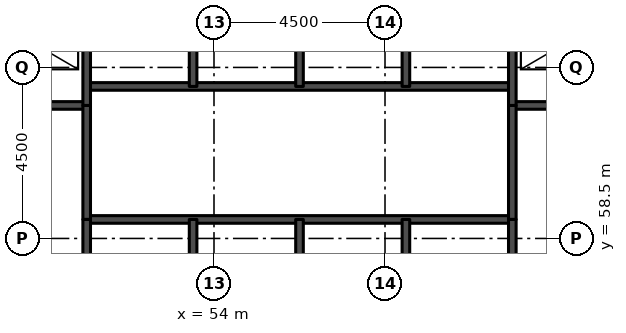
"""IFC4 building model, lengths in metres.
Left out: names, types, materials, properties, quantities, classifications, styles, units other than length and angle.
Written with IfcOpenShell. Run it as: python <this file> out.ifc"""

import sys

from ifc_helpers import new_model, si_unit, direction, frame, frame_2d, origin, place, context, subcontext, project, spatial, rectangle, extrude, element, save


model = new_model("IFC4")
c1 = context("Model", 3, precision=1e-05, world=origin(), true_north=direction((0.0, 1.0)))
c2 = subcontext(c1, "Body", "Model", "MODEL_VIEW")
j1 = project(units=[si_unit("LENGTHUNIT", "METRE"), si_unit("PLANEANGLEUNIT", "RADIAN")], contexts=[c1])
p1 = place(None, origin())
s1 = spatial("IfcSite", under=j1, at=p1, CompositionType="ELEMENT")
p2 = place(p1, origin())
s2 = spatial("IfcBuilding", under=s1, at=p2, CompositionType="ELEMENT")
p3 = place(p2, frame((0.0, 0.0, 49.5)))
s3 = spatial("IfcBuildingStorey", under=s2, at=p3, CompositionType="ELEMENT", Elevation=49.5)
p4 = place(p3, frame((50.65, 59.0, 0.0), z_axis=(0.0, 0.0, 1.0), x_axis=(1.0, 0.0, 0.0)))
e1 = element("IfcWall", 1, at=p4, inside=s3, PredefinedType="SOLIDWALL", context=c2, shape_type="SweptSolid", body=[
    extrude(rectangle(XDim=11.2, YDim=0.2, at=frame_2d((5.6, 0.0))), origin(), (0.0, 0.0, 1.0), 3.3),
])
for number, where, z_axis, x_axis in (
    (2, (45.5, 62.0, 0.0), (0.0, 0.0, 1.0), (1.0, 0.0, 0.0)),
    (3, (61.85, 62.0, 0.0), (0.0, 0.0, 1.0), (1.0, 0.0, 0.0)),
):
    element("IfcWall", number, at=place(p3, frame(where, z_axis=z_axis, x_axis=x_axis)), inside=s3, PredefinedType="SOLIDWALL", context=c2, shape_type="SweptSolid", body=[
        extrude(rectangle(XDim=5.15, YDim=0.2, at=frame_2d((2.575, 0.0))), origin(), (0.0, 0.0, 1.0), 3.08),
    ])
p5 = place(p3, frame((50.65, 62.5, 0.0), z_axis=(0.0, 0.0, 1.0), x_axis=(1.0, 0.0, 0.0)))
e4 = element("IfcWall", 4, at=p5, inside=s3, PredefinedType="SOLIDWALL", context=c2, shape_type="SweptSolid", body=[
    extrude(rectangle(XDim=11.2, YDim=0.2, at=frame_2d((5.6, 0.0))), origin(), (0.0, 0.0, 1.0), 3.3),
])
p6 = place(p3, frame((50.65, 59.0, 0.0), z_axis=(0.0, 0.0, 1.0), x_axis=(0.0, 1.0, 0.0)))
e5 = element("IfcWall", 5, at=p6, inside=s3, PredefinedType="SOLIDWALL", context=c2, shape_type="SweptSolid", body=[
    extrude(rectangle(XDim=3.0, YDim=0.2, at=frame_2d((1.5, 0.0))), origin(), (0.0, 0.0, 1.0), 3.3),
])
p7 = place(p3, frame((50.65, 56.2, 0.0), z_axis=(0.0, 0.0, 1.0), x_axis=(0.0, 1.0, 0.0)))
e6 = element("IfcWall", 6, at=p7, inside=s3, PredefinedType="SOLIDWALL", context=c2, shape_type="SweptSolid", body=[
    extrude(rectangle(XDim=2.8, YDim=0.2, at=frame_2d((1.4, 0.0))), origin(), (0.0, 0.0, 1.0), 3.08),
])
p8 = place(p3, frame((50.65, 62.0, 0.0), z_axis=(0.0, 0.0, 1.0), x_axis=(0.0, 1.0, 0.0)))
e7 = element("IfcWall", 7, at=p8, inside=s3, PredefinedType="SOLIDWALL", context=c2, shape_type="SweptSolid", body=[
    extrude(rectangle(XDim=3.3, YDim=0.2, at=frame_2d((1.65, 0.0))), origin(), (0.0, 0.0, 1.0), 3.08),
])
for number, where, z_axis, x_axis in (
    (8, (53.45, 56.2, 0.0), (0.0, 0.0, 1.0), (0.0, 1.0, 0.0)),
    (9, (53.45, 62.5, 0.0), (0.0, 0.0, 1.0), (0.0, 1.0, 0.0)),
    (10, (56.25, 56.2, 0.0), (0.0, 0.0, 1.0), (0.0, 1.0, 0.0)),
    (11, (56.25, 62.5, 0.0), (0.0, 0.0, 1.0), (0.0, 1.0, 0.0)),
    (12, (59.05, 56.2, 0.0), (0.0, 0.0, 1.0), (0.0, 1.0, 0.0)),
    (13, (59.05, 62.5, 0.0), (0.0, 0.0, 1.0), (0.0, 1.0, 0.0)),
):
    element("IfcWall", number, at=place(p3, frame(where, z_axis=z_axis, x_axis=x_axis)), inside=s3, PredefinedType="SOLIDWALL", context=c2, shape_type="SweptSolid", body=[
        extrude(rectangle(XDim=2.8, YDim=0.2, at=frame_2d((1.4, 0.0))), origin(), (0.0, 0.0, 1.0), 3.08),
    ])
p9 = place(p3, frame((61.85, 59.0, 0.0), z_axis=(0.0, 0.0, 1.0), x_axis=(0.0, 1.0, 0.0)))
e14 = element("IfcWall", 14, at=p9, inside=s3, PredefinedType="SOLIDWALL", context=c2, shape_type="SweptSolid", body=[
    extrude(rectangle(XDim=3.0, YDim=0.2, at=frame_2d((1.5, 0.0))), origin(), (0.0, 0.0, 1.0), 3.3),
])
p10 = place(p3, frame((61.85, 56.2, 0.0), z_axis=(0.0, 0.0, 1.0), x_axis=(0.0, 1.0, 0.0)))
e15 = element("IfcWall", 15, at=p10, inside=s3, PredefinedType="SOLIDWALL", context=c2, shape_type="SweptSolid", body=[
    extrude(rectangle(XDim=2.8, YDim=0.2, at=frame_2d((1.4, 0.0))), origin(), (0.0, 0.0, 1.0), 3.08),
])
p11 = place(p3, frame((61.85, 62.0, 0.0), z_axis=(0.0, 0.0, 1.0), x_axis=(0.0, 1.0, 0.0)))
e16 = element("IfcWall", 16, at=p11, inside=s3, PredefinedType="SOLIDWALL", context=c2, shape_type="SweptSolid", body=[
    extrude(rectangle(XDim=3.3, YDim=0.2, at=frame_2d((1.65, 0.0))), origin(), (0.0, 0.0, 1.0), 3.08),
])
save(model, sys.argv[1])
